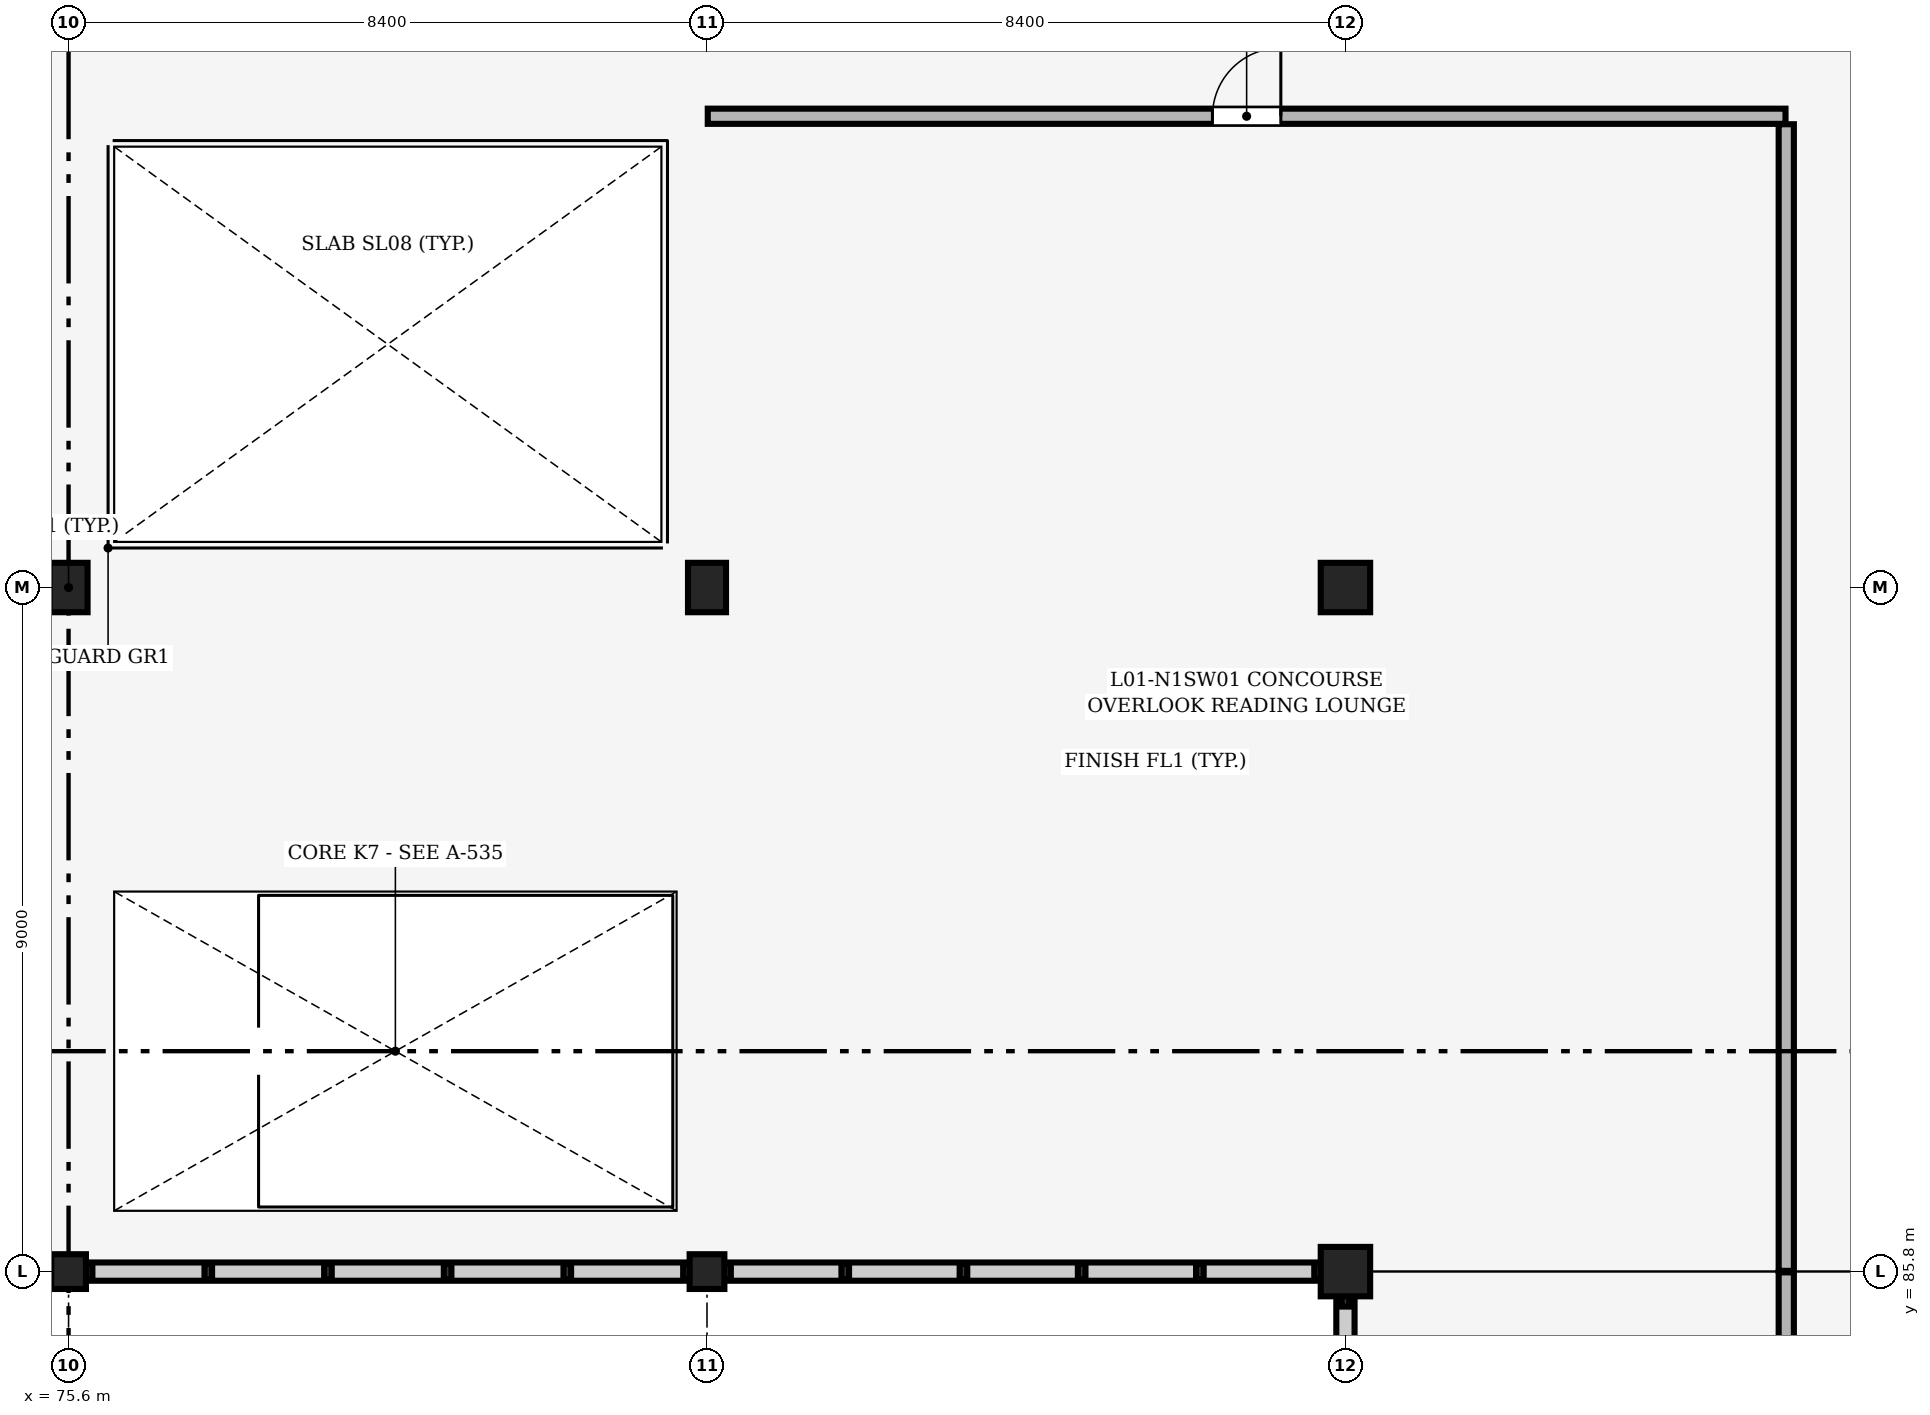
"""IFC4 building model, lengths in metres.
Left out: names, types, materials, properties, quantities, classifications, styles, units other than length and angle.
Written with IfcOpenShell. Run it as: python <this file> out.ifc"""

import sys

from ifc_helpers import new_model, si_unit, direction, frame, frame_2d, origin, origin_2d, place, context, subcontext, project, spatial, rectangle, hollow_circle, extrude, element, fill, save


model = new_model("IFC4")
c1 = context("Model", 3, precision=1e-05, world=origin(), true_north=direction((0.0, 1.0)))
c2 = subcontext(c1, "Body", "Model", "MODEL_VIEW")
j1 = project(units=[si_unit("LENGTHUNIT", "METRE"), si_unit("PLANEANGLEUNIT", "RADIAN")], contexts=[c1])
p1 = place(None, origin())
s1 = spatial("IfcSite", under=j1, at=p1, CompositionType="ELEMENT")
p2 = place(p1, origin())
s2 = spatial("IfcBuilding", under=s1, at=p2, CompositionType="ELEMENT")
p3 = place(p2, frame((0.0, 0.0, 4.8)))
s3 = spatial("IfcBuildingStorey", under=s2, at=p3, CompositionType="ELEMENT", Elevation=4.8)
for number, where, z_axis, x_axis in (
    (1, (75.6, 94.8, 0.0), (0.0, 0.0, 1.0), (1.0, 0.0, 0.0)),
    (2, (84.0, 94.8, 0.0), (0.0, 0.0, 1.0), (1.0, 0.0, 0.0)),
):
    element("IfcColumn", number, at=place(p3, frame(where, z_axis=z_axis, x_axis=x_axis)), inside=s3, PredefinedType="COLUMN", context=c2, shape_type="SweptSolid", body=[
        extrude(rectangle(XDim=0.5, YDim=0.65, at=origin_2d()), origin(), (0.0, 0.0, 1.0), 4.2),
    ])
for number, where, z_axis, x_axis in (
    (3, (92.4, 85.8, 0.0), (0.0, 0.0, 1.0), (1.0, 0.0, 0.0)),
    (4, (92.4, 94.8, 0.0), (0.0, 0.0, 1.0), (1.0, 0.0, 0.0)),
):
    element("IfcColumn", number, at=place(p3, frame(where, z_axis=z_axis, x_axis=x_axis)), inside=s3, PredefinedType="COLUMN", context=c2, shape_type="SweptSolid", body=[
        extrude(rectangle(XDim=0.65, YDim=0.65, at=origin_2d()), origin(), (0.0, 0.0, 1.0), 4.2),
    ])
for number, where, z_axis, x_axis in (
    (5, (75.6, 85.8, 0.0), (0.0, 0.0, 1.0), (1.0, 0.0, 0.0)),
    (6, (84.0, 85.8, 0.0), (0.0, 0.0, 1.0), (1.0, 0.0, 0.0)),
):
    element("IfcColumn", number, at=place(p3, frame(where, z_axis=z_axis, x_axis=x_axis)), inside=s3, PredefinedType="USERDEFINED", context=c2, shape_type="SweptSolid", body=[
        extrude(hollow_circle(Radius=0.229, WallThickness=0.013, at=origin_2d()), origin(), (0.0, 0.0, 1.0), 4.2),
    ])
p4 = place(p3, frame((67.475, 85.8, 0.0), z_axis=(0.0, 0.0, 1.0), x_axis=(1.0, 0.0, 0.0)))
e7 = element("IfcWall", 7, at=p4, inside=s3, PredefinedType="SOLIDWALL", context=c2, shape_type="SweptSolid", body=[
    extrude(rectangle(XDim=7.921, YDim=0.24, at=frame_2d((3.961, 0.0))), origin(), (0.0, 0.0, 1.0), 1.1),
])
p5 = place(p3, frame((75.804, 85.8, 0.0), z_axis=(0.0, 0.0, 1.0), x_axis=(1.0, 0.0, 0.0)))
e8 = element("IfcWall", 8, at=p5, inside=s3, PredefinedType="SOLIDWALL", context=c2, shape_type="SweptSolid", body=[
    extrude(rectangle(XDim=7.993, YDim=0.24, at=frame_2d((3.996, 0.0))), origin(), (0.0, 0.0, 1.0), 1.1),
])
p6 = place(p3, frame((84.204, 85.8, 0.0), z_axis=(0.0, 0.0, 1.0), x_axis=(1.0, 0.0, 0.0)))
e9 = element("IfcWall", 9, at=p6, inside=s3, PredefinedType="SOLIDWALL", context=c2, shape_type="SweptSolid", body=[
    extrude(rectangle(XDim=7.896, YDim=0.24, at=frame_2d((3.948, 0.0))), origin(), (0.0, 0.0, 1.0), 1.1),
])
p7 = place(p3, frame((92.4, 77.7, 0.0), z_axis=(0.0, 0.0, 1.0), x_axis=(0.0, 1.0, 0.0)))
e10 = element("IfcWall", 10, at=p7, inside=s3, PredefinedType="SOLIDWALL", context=c2, shape_type="SweptSolid", body=[
    extrude(rectangle(XDim=7.8, YDim=0.24, at=frame_2d((3.9, 0.0))), origin(), (0.0, 0.0, 1.0), 1.15),
])
p8 = place(p3, frame((84.01, 101.0, 0.0), z_axis=(0.0, 0.0, 1.0), x_axis=(1.0, 0.0, 0.0)))
e11 = element("IfcWall", 11, at=p8, inside=s3, PredefinedType="PARTITIONING", context=c2, shape_type="SweptSolid", body=[
    extrude(rectangle(XDim=14.18, YDim=0.2, at=frame_2d((7.09, 0.0))), origin(), (0.0, 0.0, 1.0), 3.44),
])
p9 = place(p8, frame((6.64, 0.0, 0.0)))
e12 = element("IfcOpeningElement", 12, at=p9, cuts=e11, PredefinedType="OPENING", context=c2, shape_type="SweptSolid", body=[
    extrude(rectangle(XDim=0.9, YDim=2.1, at=frame_2d((0.45, 1.05))), frame((0.0, 0.11, 0.0), z_axis=(0.0, -1.0, 0.0), x_axis=(1.0, 0.0, 0.0)), (0.0, 0.0, 1.0), 0.22),
])
p10 = place(p3, frame((98.2, 85.81, 0.0), z_axis=(0.0, 0.0, 1.0), x_axis=(0.0, 1.0, 0.0)))
e13 = element("IfcWall", 13, at=p10, inside=s3, PredefinedType="PARTITIONING", context=c2, shape_type="SweptSolid", body=[
    extrude(rectangle(XDim=15.085, YDim=0.2, at=frame_2d((7.542, 0.0))), origin(), (0.0, 0.0, 1.0), 3.9),
])
p11 = place(p3, frame((98.2, 18.165, 0.0), z_axis=(0.0, 0.0, 1.0), x_axis=(0.0, 1.0, 0.0)))
e14 = element("IfcWall", 14, at=p11, inside=s3, PredefinedType="PARTITIONING", context=c2, shape_type="SweptSolid", body=[
    extrude(rectangle(XDim=67.625, YDim=0.2, at=frame_2d((33.812, 0.0))), origin(), (0.0, 0.0, 1.0), 3.9),
])
p12 = place(p11, frame((2.035, 0.0, 0.0)))
e15 = element("IfcOpeningElement", 15, at=p12, cuts=e14, PredefinedType="OPENING", context=c2, shape_type="SweptSolid", body=[
    extrude(rectangle(XDim=1.0, YDim=2.15, at=frame_2d((0.5, 1.075))), frame((0.0, 0.11, 0.0), z_axis=(0.0, -1.0, 0.0), x_axis=(1.0, 0.0, 0.0)), (0.0, 0.0, 1.0), 0.22),
])
p13 = place(p11, frame((5.885, 0.0, 0.0)))
e16 = element("IfcOpeningElement", 16, at=p13, cuts=e14, PredefinedType="OPENING", context=c2, shape_type="SweptSolid", body=[
    extrude(rectangle(XDim=1.5, YDim=2.2, at=frame_2d((0.75, 1.1))), frame((0.0, 0.11, 0.0), z_axis=(0.0, -1.0, 0.0), x_axis=(1.0, 0.0, 0.0)), (0.0, 0.0, 1.0), 0.22),
])
p14 = place(p11, frame((13.335, 0.0, 0.0)))
e17 = element("IfcOpeningElement", 17, at=p14, cuts=e14, PredefinedType="OPENING", context=c2, shape_type="SweptSolid", body=[
    extrude(rectangle(XDim=1.0, YDim=2.15, at=frame_2d((0.5, 1.075))), frame((0.0, 0.11, 0.0), z_axis=(0.0, -1.0, 0.0), x_axis=(1.0, 0.0, 0.0)), (0.0, 0.0, 1.0), 0.22),
])
p15 = place(p11, frame((23.335, 0.0, 0.0)))
e18 = element("IfcOpeningElement", 18, at=p15, cuts=e14, PredefinedType="OPENING", context=c2, shape_type="SweptSolid", body=[
    extrude(rectangle(XDim=1.0, YDim=2.15, at=frame_2d((0.5, 1.075))), frame((0.0, 0.11, 0.0), z_axis=(0.0, -1.0, 0.0), x_axis=(1.0, 0.0, 0.0)), (0.0, 0.0, 1.0), 0.22),
])
p16 = place(p11, frame((30.46, 0.0, 0.0)))
e19 = element("IfcOpeningElement", 19, at=p16, cuts=e14, PredefinedType="OPENING", context=c2, shape_type="SweptSolid", body=[
    extrude(rectangle(XDim=0.95, YDim=2.2, at=frame_2d((0.475, 1.1))), frame((0.0, 0.11, 0.0), z_axis=(0.0, -1.0, 0.0), x_axis=(1.0, 0.0, 0.0)), (0.0, 0.0, 1.0), 0.22),
])
p17 = place(p11, frame((36.26, 0.0, 0.0)))
e20 = element("IfcOpeningElement", 20, at=p17, cuts=e14, PredefinedType="OPENING", context=c2, shape_type="SweptSolid", body=[
    extrude(rectangle(XDim=0.95, YDim=2.2, at=frame_2d((0.475, 1.1))), frame((0.0, 0.11, 0.0), z_axis=(0.0, -1.0, 0.0), x_axis=(1.0, 0.0, 0.0)), (0.0, 0.0, 1.0), 0.22),
])
p18 = place(p11, frame((41.36, 0.0, 0.0)))
e21 = element("IfcOpeningElement", 21, at=p18, cuts=e14, PredefinedType="OPENING", context=c2, shape_type="SweptSolid", body=[
    extrude(rectangle(XDim=0.95, YDim=2.1, at=frame_2d((0.475, 1.05))), frame((0.0, 0.11, 0.0), z_axis=(0.0, -1.0, 0.0), x_axis=(1.0, 0.0, 0.0)), (0.0, 0.0, 1.0), 0.22),
])
p19 = place(p11, frame((49.735, 0.0, 0.0)))
e22 = element("IfcOpeningElement", 22, at=p19, cuts=e14, PredefinedType="OPENING", context=c2, shape_type="SweptSolid", body=[
    extrude(rectangle(XDim=1.0, YDim=2.15, at=frame_2d((0.5, 1.075))), frame((0.0, 0.11, 0.0), z_axis=(0.0, -1.0, 0.0), x_axis=(1.0, 0.0, 0.0)), (0.0, 0.0, 1.0), 0.22),
])
p20 = place(p11, frame((61.535, 0.0, 0.0)))
e23 = element("IfcOpeningElement", 23, at=p20, cuts=e14, PredefinedType="OPENING", context=c2, shape_type="SweptSolid", body=[
    extrude(rectangle(XDim=1.0, YDim=2.15, at=frame_2d((0.5, 1.075))), frame((0.0, 0.11, 0.0), z_axis=(0.0, -1.0, 0.0), x_axis=(1.0, 0.0, 0.0)), (0.0, 0.0, 1.0), 0.22),
])
p21 = place(p9, origin())
e24 = element("IfcDoor", 24, at=p21, inside=s3, OperationType="SINGLE_SWING_RIGHT", PredefinedType="DOOR", context=c2, shape_type="SweptSolid", body=[
    extrude(rectangle(XDim=0.9, YDim=2.1, at=frame_2d((0.45, 1.05))), frame((0.0, 0.025, 0.0), z_axis=(0.0, -1.0, 0.0), x_axis=(1.0, 0.0, 0.0)), (0.0, 0.0, 1.0), 0.05),
])
fill(e12, e24)
save(model, sys.argv[1])
